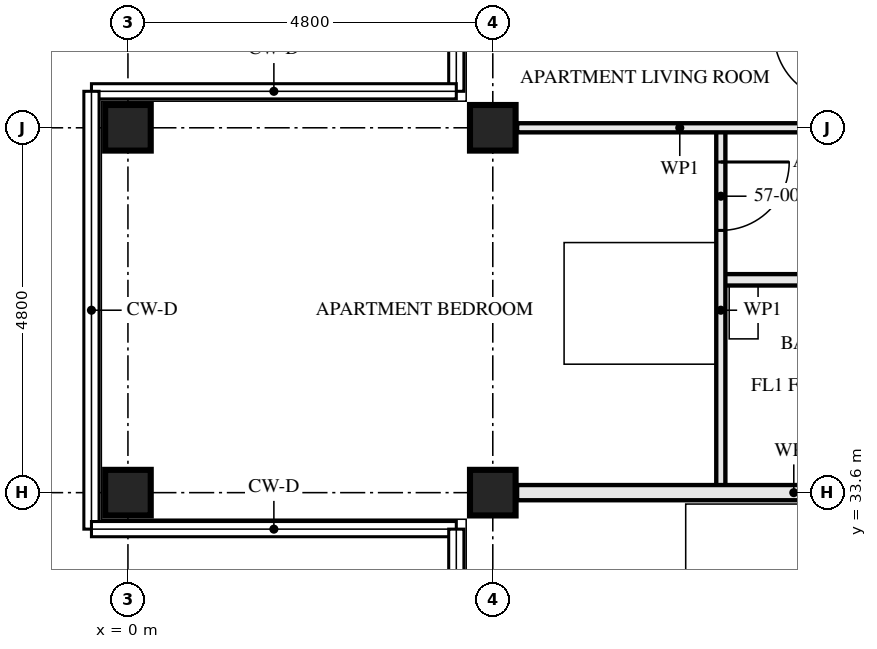
"""IFC4 building model, lengths in metres.
Left out: names, types, materials, properties, quantities, classifications, styles, units other than length and angle.
Written with IfcOpenShell. Run it as: python <this file> out.ifc"""

import sys

from ifc_helpers import new_model, si_unit, direction, frame, frame_2d, origin, origin_2d, place, context, subcontext, project, spatial, rectangle, hollow_rectangle, extrude, element, fill, save


model = new_model("IFC4")
c1 = context("Model", 3, precision=1e-05, world=origin(), true_north=direction((0.0, 1.0)))
c2 = subcontext(c1, "Body", "Model", "MODEL_VIEW")
j1 = project(units=[si_unit("LENGTHUNIT", "METRE"), si_unit("PLANEANGLEUNIT", "RADIAN")], contexts=[c1])
p1 = place(None, origin())
s1 = spatial("IfcSite", under=j1, at=p1, CompositionType="ELEMENT")
p2 = place(p1, origin())
s2 = spatial("IfcBuilding", under=s1, at=p2, CompositionType="ELEMENT")
p3 = place(p2, frame((0.0, 0.0, 208.5)))
s3 = spatial("IfcBuildingStorey", under=s2, at=p3, CompositionType="ELEMENT", Elevation=208.5)
for number, where, z_axis, x_axis in (
    (1, (0.0, 33.6, 0.0), (0.0, 0.0, 1.0), (0.0, 1.0, 0.0)),
    (2, (0.0, 38.4, 0.0), (0.0, 0.0, 1.0), (0.0, 1.0, 0.0)),
    (3, (4.8, 33.6, 0.0), (0.0, 0.0, 1.0), (0.0, 1.0, 0.0)),
    (4, (4.8, 38.4, 0.0), (0.0, 0.0, 1.0), (0.0, 1.0, 0.0)),
):
    element("IfcColumn", number, at=place(p3, frame(where, z_axis=z_axis, x_axis=x_axis)), inside=s3, PredefinedType="COLUMN", context=c2, shape_type="SweptSolid", body=[
        extrude(hollow_rectangle(XDim=0.6, YDim=0.6, WallThickness=0.05, at=origin_2d()), origin(), (0.0, 0.0, 1.0), 3.5),
    ])
p4 = place(p3, frame((7.8, 36.4, 0.0), z_axis=(0.0, 0.0, 1.0), x_axis=(1.0, 0.0, 0.0)))
e5 = element("IfcWall", 5, at=p4, inside=s3, PredefinedType="PARTITIONING", context=c2, shape_type="SweptSolid", body=[
    extrude(rectangle(XDim=3.0, YDim=0.15, at=frame_2d((1.5, 0.0))), origin(), (0.0, 0.0, 1.0), 3.33),
])
p5 = place(p4, frame((1.05, 0.0, 0.0)))
e6 = element("IfcOpeningElement", 6, at=p5, cuts=e5, PredefinedType="OPENING", context=c2, shape_type="SweptSolid", body=[
    extrude(rectangle(XDim=0.9, YDim=2.1, at=frame_2d((0.45, 1.05))), frame((0.0, 0.085, 0.0), z_axis=(0.0, -1.0, 0.0), x_axis=(1.0, 0.0, 0.0)), (0.0, 0.0, 1.0), 0.171),
])
p6 = place(p3, frame((7.8, 38.4, 0.0), z_axis=(0.0, 0.0, 1.0), x_axis=(0.0, -1.0, 0.0)))
e7 = element("IfcWall", 7, at=p6, inside=s3, PredefinedType="PARTITIONING", context=c2, shape_type="SweptSolid", body=[
    extrude(rectangle(XDim=4.8, YDim=0.12, at=frame_2d((2.4, 0.0))), origin(), (0.0, 0.0, 1.0), 3.33),
])
p7 = place(p6, frame((0.45, 0.0, 0.0)))
e8 = element("IfcOpeningElement", 8, at=p7, cuts=e7, PredefinedType="OPENING", context=c2, shape_type="SweptSolid", body=[
    extrude(rectangle(XDim=0.9, YDim=2.1, at=frame_2d((0.45, 1.05))), frame((0.0, 0.071, 0.0), z_axis=(0.0, -1.0, 0.0), x_axis=(1.0, 0.0, 0.0)), (0.0, 0.0, 1.0), 0.141),
])
p8 = place(p3, frame((5.12, 38.4, 0.0), z_axis=(0.0, 0.0, 1.0), x_axis=(1.0, 0.0, 0.0)))
e9 = element("IfcWall", 9, at=p8, inside=s3, PredefinedType="PARTITIONING", context=c2, shape_type="SweptSolid", body=[
    extrude(rectangle(XDim=4.28, YDim=0.12, at=frame_2d((2.14, 0.0))), origin(), (0.0, 0.0, 1.0), 2.55),
])
p9 = place(p3, frame((5.12, 33.6, 0.0), z_axis=(0.0, 0.0, 1.0), x_axis=(1.0, 0.0, 0.0)))
e10 = element("IfcWall", 10, at=p9, inside=s3, PredefinedType="PARTITIONING", context=c2, shape_type="SweptSolid", body=[
    extrude(rectangle(XDim=7.28, YDim=0.2, at=frame_2d((3.64, 0.0))), origin(), (0.0, 0.0, 1.0), 2.55),
])
p10 = place(p7, origin())
e11 = element("IfcDoor", 11, at=p10, inside=s3, OperationType="SINGLE_SWING_RIGHT", PredefinedType="DOOR", context=c2, shape_type="SweptSolid", body=[
    extrude(rectangle(XDim=0.9, YDim=2.1, at=frame_2d((0.45, 1.05))), frame((0.0, 0.022, 0.0), z_axis=(0.0, -1.0, 0.0), x_axis=(1.0, 0.0, 0.0)), (0.0, 0.0, 1.0), 0.044),
])
fill(e8, e11)
save(model, sys.argv[1])
